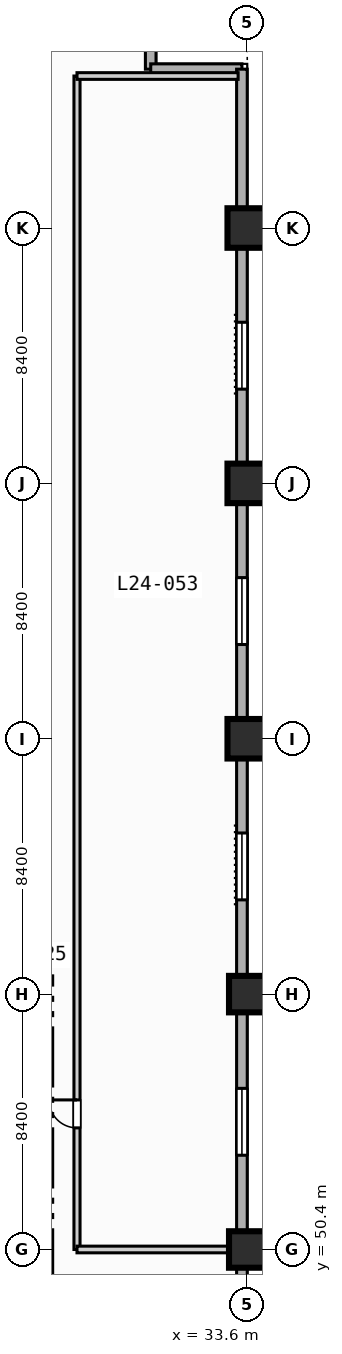
"""IFC4 building model, lengths in metres.
Left out: names, types, materials, properties, quantities, classifications, styles, units other than length and angle.
Written with IfcOpenShell. Run it as: python <this file> out.ifc"""

import sys

from ifc_helpers import new_model, si_unit, direction, frame, frame_2d, origin, origin_2d, place, context, subcontext, project, spatial, rectangle, extrude, element, fill, save


model = new_model("IFC4")
c1 = context("Model", 3, precision=1e-05, world=origin(), true_north=direction((0.0, 1.0)))
c2 = subcontext(c1, "Body", "Model", "MODEL_VIEW")
j1 = project(units=[si_unit("LENGTHUNIT", "METRE"), si_unit("PLANEANGLEUNIT", "RADIAN")], contexts=[c1])
p1 = place(None, origin())
s1 = spatial("IfcSite", under=j1, at=p1, CompositionType="ELEMENT")
p2 = place(p1, origin())
s2 = spatial("IfcBuilding", under=s1, at=p2, CompositionType="ELEMENT")
p3 = place(p2, frame((0.0, 0.0, 103.8)))
s3 = spatial("IfcBuildingStorey", under=s2, at=p3, CompositionType="ELEMENT", Elevation=103.8)
for number, where, z_axis, x_axis in (
    (1, (33.6, 50.4, 0.0), (0.0, 0.0, 1.0), (1.0, 0.0, 0.0)),
    (2, (33.6, 58.8, 0.0), (0.0, 0.0, 1.0), (1.0, 0.0, 0.0)),
):
    element("IfcColumn", number, at=place(p3, frame(where, z_axis=z_axis, x_axis=x_axis)), inside=s3, PredefinedType="COLUMN", context=c2, shape_type="SweptSolid", body=[
        extrude(rectangle(XDim=1.2, YDim=1.2, at=origin_2d()), origin(), (0.0, 0.0, 1.0), 3.8),
    ])
for number, where, z_axis, x_axis in (
    (3, (33.6, 67.2, 0.0), (0.0, 0.0, 1.0), (1.0, 0.0, 0.0)),
    (4, (33.6, 75.6, 0.0), (0.0, 0.0, 1.0), (1.0, 0.0, 0.0)),
    (5, (33.6, 84.0, 0.0), (0.0, 0.0, 1.0), (1.0, 0.0, 0.0)),
):
    element("IfcColumn", number, at=place(p3, frame(where, z_axis=z_axis, x_axis=x_axis)), inside=s3, PredefinedType="COLUMN", context=c2, shape_type="SweptSolid", body=[
        extrude(rectangle(XDim=1.3, YDim=1.3, at=origin_2d()), origin(), (0.0, 0.0, 1.0), 3.8),
    ])
for number, where, z_axis, x_axis in (
    (6, (30.425, 92.225, 0.0), (0.0, 0.0, 1.0), (0.0, -1.0, 0.0)),
    (7, (30.425, 89.225, 0.0), (0.0, 0.0, 1.0), (1.0, 0.0, 0.0)),
):
    element("IfcWall", number, at=place(p3, frame(where, z_axis=z_axis, x_axis=x_axis)), inside=s3, PredefinedType="STANDARD", context=c2, shape_type="SweptSolid", body=[
        extrude(rectangle(XDim=3.0, YDim=0.35, at=frame_2d((1.5, 0.0))), origin(), (0.0, 0.0, 1.0), 3.55),
    ])
p4 = place(p3, frame((33.425, 89.225, 0.0), z_axis=(0.0, 0.0, 1.0), x_axis=(0.0, -1.0, 0.0)))
e8 = element("IfcWall", 8, at=p4, inside=s3, PredefinedType="STANDARD", context=c2, shape_type="SweptSolid", body=[
    extrude(rectangle(XDim=55.8, YDim=0.35, at=frame_2d((27.9, 0.0))), origin(), (0.0, 0.0, 1.0), 3.55),
])
p5 = place(p4, frame((50.325, 0.0, 0.85)))
e9 = element("IfcOpeningElement", 9, at=p5, cuts=e8, PredefinedType="OPENING", context=c2, shape_type="SweptSolid", body=[
    extrude(rectangle(XDim=2.2, YDim=1.8, at=frame_2d((1.1, 0.9))), frame((0.0, 0.185, 0.0), z_axis=(0.0, -1.0, 0.0), x_axis=(1.0, 0.0, 0.0)), (0.0, 0.0, 1.0), 0.37),
])
p6 = place(p4, frame((33.525, 0.0, 0.85)))
e10 = element("IfcOpeningElement", 10, at=p6, cuts=e8, PredefinedType="OPENING", context=c2, shape_type="SweptSolid", body=[
    extrude(rectangle(XDim=2.2, YDim=1.8, at=frame_2d((1.1, 0.9))), frame((0.0, 0.185, 0.0), z_axis=(0.0, -1.0, 0.0), x_axis=(1.0, 0.0, 0.0)), (0.0, 0.0, 1.0), 0.37),
])
p7 = place(p4, frame((25.125, 0.0, 0.85)))
e11 = element("IfcOpeningElement", 11, at=p7, cuts=e8, PredefinedType="OPENING", context=c2, shape_type="SweptSolid", body=[
    extrude(rectangle(XDim=2.2, YDim=1.8, at=frame_2d((1.1, 0.9))), frame((0.0, 0.185, 0.0), z_axis=(0.0, -1.0, 0.0), x_axis=(1.0, 0.0, 0.0)), (0.0, 0.0, 1.0), 0.37),
])
p8 = place(p4, frame((16.725, 0.0, 0.85)))
e12 = element("IfcOpeningElement", 12, at=p8, cuts=e8, PredefinedType="OPENING", context=c2, shape_type="SweptSolid", body=[
    extrude(rectangle(XDim=2.2, YDim=1.8, at=frame_2d((1.1, 0.9))), frame((0.0, 0.185, 0.0), z_axis=(0.0, -1.0, 0.0), x_axis=(1.0, 0.0, 0.0)), (0.0, 0.0, 1.0), 0.37),
])
p9 = place(p4, frame((8.325, 0.0, 0.85)))
e13 = element("IfcOpeningElement", 13, at=p9, cuts=e8, PredefinedType="OPENING", context=c2, shape_type="SweptSolid", body=[
    extrude(rectangle(XDim=2.2, YDim=1.8, at=frame_2d((1.1, 0.9))), frame((0.0, 0.185, 0.0), z_axis=(0.0, -1.0, 0.0), x_axis=(1.0, 0.0, 0.0)), (0.0, 0.0, 1.0), 0.37),
])
p10 = place(p3, frame((28.0, 50.4, 0.0), z_axis=(0.0, 0.0, 1.0), x_axis=(0.0, 1.0, 0.0)))
e14 = element("IfcWall", 14, at=p10, inside=s3, PredefinedType="PARTITIONING", context=c2, shape_type="SweptSolid", body=[
    extrude(rectangle(XDim=38.6, YDim=0.2, at=frame_2d((19.3, 0.0))), origin(), (0.0, 0.0, 1.0), 3.55),
])
p11 = place(p10, frame((4.0, 0.0, 0.0)))
e15 = element("IfcOpeningElement", 15, at=p11, cuts=e14, PredefinedType="OPENING", context=c2, shape_type="SweptSolid", body=[
    extrude(rectangle(XDim=0.92, YDim=2.1, at=frame_2d((0.46, 1.05))), frame((0.0, 0.11, 0.0), z_axis=(0.0, -1.0, 0.0), x_axis=(1.0, 0.0, 0.0)), (0.0, 0.0, 1.0), 0.22),
])
p12 = place(p3, frame((28.0, 50.4, 0.0), z_axis=(0.0, 0.0, 1.0), x_axis=(1.0, 0.0, 0.0)))
e16 = element("IfcWall", 16, at=p12, inside=s3, PredefinedType="PARTITIONING", context=c2, shape_type="SweptSolid", body=[
    extrude(rectangle(XDim=5.3, YDim=0.22, at=frame_2d((2.65, 0.0))), origin(), (0.0, 0.0, 1.0), 3.087),
])
p13 = place(p3, frame((28.0, 89.0, 0.0), z_axis=(0.0, 0.0, 1.0), x_axis=(1.0, 0.0, 0.0)))
e17 = element("IfcWall", 17, at=p13, inside=s3, PredefinedType="PARTITIONING", context=c2, shape_type="SweptSolid", body=[
    extrude(rectangle(XDim=5.3, YDim=0.22, at=frame_2d((2.65, 0.0))), origin(), (0.0, 0.0, 1.0), 3.55),
])
p14 = place(p6, origin())
e18 = element("IfcWindow", 18, at=p14, inside=s3, PartitioningType="SINGLE_PANEL", PredefinedType="WINDOW", context=c2, shape_type="SweptSolid", body=[
    extrude(rectangle(XDim=2.2, YDim=1.8, at=frame_2d((1.1, 0.9))), frame((0.0, 0.03, 0.0), z_axis=(0.0, -1.0, 0.0), x_axis=(1.0, 0.0, 0.0)), (0.0, 0.0, 1.0), 0.06),
])
fill(e10, e18)
p15 = place(p7, origin())
e19 = element("IfcWindow", 19, at=p15, inside=s3, PartitioningType="SINGLE_PANEL", PredefinedType="WINDOW", context=c2, shape_type="SweptSolid", body=[
    extrude(rectangle(XDim=2.2, YDim=1.8, at=frame_2d((1.1, 0.9))), frame((0.0, 0.03, 0.0), z_axis=(0.0, -1.0, 0.0), x_axis=(1.0, 0.0, 0.0)), (0.0, 0.0, 1.0), 0.06),
])
fill(e11, e19)
p16 = place(p8, origin())
e20 = element("IfcWindow", 20, at=p16, inside=s3, PartitioningType="SINGLE_PANEL", PredefinedType="WINDOW", context=c2, shape_type="SweptSolid", body=[
    extrude(rectangle(XDim=2.2, YDim=1.8, at=frame_2d((1.1, 0.9))), frame((0.0, 0.03, 0.0), z_axis=(0.0, -1.0, 0.0), x_axis=(1.0, 0.0, 0.0)), (0.0, 0.0, 1.0), 0.06),
])
fill(e12, e20)
p17 = place(p9, origin())
e21 = element("IfcWindow", 21, at=p17, inside=s3, PartitioningType="SINGLE_PANEL", PredefinedType="WINDOW", context=c2, shape_type="SweptSolid", body=[
    extrude(rectangle(XDim=2.2, YDim=1.8, at=frame_2d((1.1, 0.9))), frame((0.0, 0.03, 0.0), z_axis=(0.0, -1.0, 0.0), x_axis=(1.0, 0.0, 0.0)), (0.0, 0.0, 1.0), 0.06),
])
fill(e13, e21)
p18 = place(p11, origin())
e22 = element("IfcDoor", 22, at=p18, inside=s3, OperationType="SINGLE_SWING_RIGHT", PredefinedType="DOOR", context=c2, shape_type="SweptSolid", body=[
    extrude(rectangle(XDim=0.92, YDim=2.1, at=frame_2d((0.46, 1.05))), frame((0.0, 0.025, 0.0), z_axis=(0.0, -1.0, 0.0), x_axis=(1.0, 0.0, 0.0)), (0.0, 0.0, 1.0), 0.05),
])
fill(e15, e22)
save(model, sys.argv[1])
